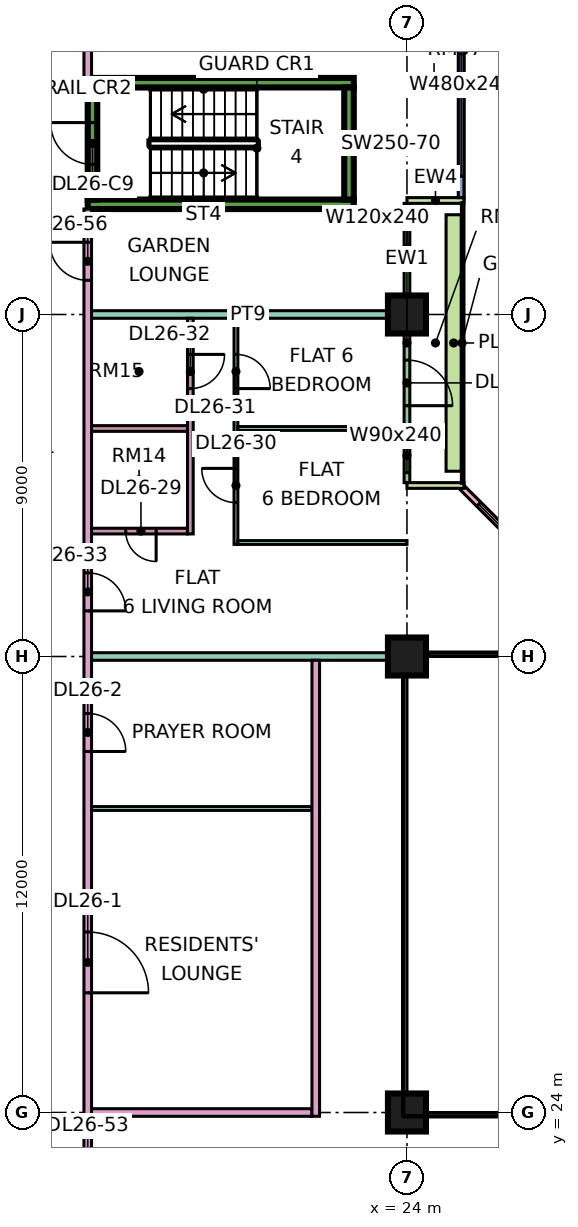
"""IFC4 building model, lengths in metres.
Left out: names, types, materials, properties, quantities, classifications, styles, units other than length and angle.
Written with IfcOpenShell. Run it as: python <this file> out.ifc"""

import sys

from ifc_helpers import new_model, si_unit, direction, frame, frame_2d, origin, origin_2d, place, context, subcontext, project, spatial, rectangle, extrude, element, fill, save


model = new_model("IFC4")
c1 = context("Model", 3, precision=1e-05, world=origin(), true_north=direction((0.0, 1.0)))
c2 = subcontext(c1, "Body", "Model", "MODEL_VIEW")
j1 = project(units=[si_unit("LENGTHUNIT", "METRE"), si_unit("PLANEANGLEUNIT", "RADIAN")], contexts=[c1])
p1 = place(None, origin())
s1 = spatial("IfcSite", under=j1, at=p1, CompositionType="ELEMENT")
p2 = place(p1, origin())
s2 = spatial("IfcBuilding", under=s1, at=p2, CompositionType="ELEMENT")
p3 = place(p2, frame((0.0, 0.0, 114.4)))
s3 = spatial("IfcBuildingStorey", under=s2, at=p3, CompositionType="ELEMENT", Elevation=114.4)
for number, where, z_axis, x_axis in (
    (1, (24.0, 24.0, 0.0), (0.0, 0.0, 1.0), (1.0, 0.0, 0.0)),
    (2, (24.0, 36.0, 0.0), (0.0, 0.0, 1.0), (1.0, 0.0, 0.0)),
    (3, (24.0, 45.0, 0.0), (0.0, 0.0, 1.0), (1.0, 0.0, 0.0)),
):
    element("IfcColumn", number, at=place(p3, frame(where, z_axis=z_axis, x_axis=x_axis)), inside=s3, PredefinedType="COLUMN", context=c2, shape_type="SweptSolid", body=[
        extrude(rectangle(XDim=1.0, YDim=1.0, at=origin_2d()), origin(), (0.0, 0.0, 1.0), 3.75),
    ])
for number, where, z_axis, x_axis in (
    (4, (15.6, 47.9, 0.0), (0.0, 0.0, 1.0), (1.0, 0.0, 0.0)),
    (5, (15.6, 51.1, 0.0), (0.0, 0.0, 1.0), (1.0, 0.0, 0.0)),
):
    element("IfcWall", number, at=place(p3, frame(where, z_axis=z_axis, x_axis=x_axis)), inside=s3, PredefinedType="SHEAR", context=c2, shape_type="SweptSolid", body=[
        extrude(rectangle(XDim=7.0, YDim=0.25, at=frame_2d((3.5, 0.0))), origin(), (0.0, 0.0, 1.0), 3.75),
    ])
p4 = place(p3, frame((15.725, 48.025, 0.0), z_axis=(0.0, 0.0, 1.0), x_axis=(0.0, 1.0, 0.0)))
e6 = element("IfcWall", 6, at=p4, inside=s3, PredefinedType="SHEAR", context=c2, shape_type="SweptSolid", body=[
    extrude(rectangle(XDim=2.95, YDim=0.25, at=frame_2d((1.475, 0.0))), origin(), (0.0, 0.0, 1.0), 3.75),
])
p5 = place(p4, frame((0.925, 0.0, 0.0)))
e7 = element("IfcOpeningElement", 7, at=p5, cuts=e6, PredefinedType="OPENING", context=c2, shape_type="SweptSolid", body=[
    extrude(rectangle(XDim=1.1, YDim=2.2, at=frame_2d((0.55, 1.1))), frame((0.0, 0.135, 0.0), z_axis=(0.0, -1.0, 0.0), x_axis=(1.0, 0.0, 0.0)), (0.0, 0.0, 1.0), 0.27),
])
p6 = place(p3, frame((22.475, 48.025, 0.0), z_axis=(0.0, 0.0, 1.0), x_axis=(0.0, 1.0, 0.0)))
e8 = element("IfcWall", 8, at=p6, inside=s3, PredefinedType="SHEAR", context=c2, shape_type="SweptSolid", body=[
    extrude(rectangle(XDim=2.95, YDim=0.25, at=frame_2d((1.475, 0.0))), origin(), (0.0, 0.0, 1.0), 3.75),
])
p7 = place(p3, frame((28.447, 37.447, 0.0), z_axis=(0.0, 0.0, 1.0), x_axis=(-0.707106781187, 0.707106781187, 0.0)))
e9 = element("IfcWall", 9, at=p7, inside=s3, PredefinedType="SOLIDWALL", context=c2, shape_type="SweptSolid", body=[
    extrude(rectangle(XDim=4.243, YDim=0.15, at=frame_2d((2.121, 0.0))), origin(), (0.0, 0.0, 1.0), 3.35),
])
p8 = place(p7, frame((0.621, 0.0, 0.45)))
e10 = element("IfcOpeningElement", 10, at=p8, cuts=e9, PredefinedType="OPENING", context=c2, shape_type="SweptSolid", body=[
    extrude(rectangle(XDim=3.0, YDim=2.4, at=frame_2d((1.5, 1.2))), frame((0.0, 0.085, 0.0), z_axis=(0.0, -1.0, 0.0), x_axis=(1.0, 0.0, 0.0)), (0.0, 0.0, 1.0), 0.17),
])
p9 = place(p3, frame((24.0, 40.575, 0.0), z_axis=(0.0, 0.0, 1.0), x_axis=(0.0, 1.0, 0.0)))
e11 = element("IfcWall", 11, at=p9, inside=s3, PredefinedType="SOLIDWALL", context=c2, shape_type="SweptSolid", body=[
    extrude(rectangle(XDim=7.35, YDim=0.15, at=frame_2d((3.675, 0.0))), origin(), (0.0, 0.0, 1.0), 3.35),
])
p10 = place(p9, frame((0.262, 0.0, 0.45)))
e12 = element("IfcOpeningElement", 12, at=p10, cuts=e11, PredefinedType="OPENING", context=c2, shape_type="SweptSolid", body=[
    extrude(rectangle(XDim=0.9, YDim=2.4, at=frame_2d((0.45, 1.2))), frame((0.0, 0.085, 0.0), z_axis=(0.0, -1.0, 0.0), x_axis=(1.0, 0.0, 0.0)), (0.0, 0.0, 1.0), 0.17),
])
p11 = place(p9, frame((2.025, 0.0, 0.0)))
e13 = element("IfcOpeningElement", 13, at=p11, cuts=e11, PredefinedType="OPENING", context=c2, shape_type="SweptSolid", body=[
    extrude(rectangle(XDim=1.2, YDim=2.4, at=frame_2d((0.6, 1.2))), frame((0.0, 0.085, 0.0), z_axis=(0.0, -1.0, 0.0), x_axis=(1.0, 0.0, 0.0)), (0.0, 0.0, 1.0), 0.17),
])
p12 = place(p9, frame((5.587, 0.0, 0.45)))
e14 = element("IfcOpeningElement", 14, at=p12, cuts=e11, PredefinedType="OPENING", context=c2, shape_type="SweptSolid", body=[
    extrude(rectangle(XDim=1.2, YDim=2.4, at=frame_2d((0.6, 1.2))), frame((0.0, 0.085, 0.0), z_axis=(0.0, -1.0, 0.0), x_axis=(1.0, 0.0, 0.0)), (0.0, 0.0, 1.0), 0.17),
])
for number, where, z_axis, x_axis in (
    (15, (25.5, 40.5, 0.0), (0.0, 0.0, 1.0), (-1.0, 0.0, 0.0)),
    (16, (25.5, 48.0, 0.0), (0.0, 0.0, 1.0), (-1.0, 0.0, 0.0)),
):
    element("IfcWall", number, at=place(p3, frame(where, z_axis=z_axis, x_axis=x_axis)), inside=s3, PredefinedType="SOLIDWALL", context=c2, shape_type="SweptSolid", body=[
        extrude(rectangle(XDim=1.5, YDim=0.15, at=frame_2d((0.75, 0.0))), origin(), (0.0, 0.0, 1.0), 3.35),
    ])
p13 = place(p3, frame((25.425, 48.075, 0.0), z_axis=(0.0, 0.0, 1.0), x_axis=(0.0, 1.0, 0.0)))
e17 = element("IfcWall", 17, at=p13, inside=s3, PredefinedType="SOLIDWALL", context=c2, shape_type="SweptSolid", body=[
    extrude(rectangle(XDim=13.425, YDim=0.15, at=frame_2d((6.712, 0.0))), origin(), (0.0, 0.0, 1.0), 3.35),
])
p14 = place(p13, frame((0.562, 0.0, 0.45)))
e18 = element("IfcOpeningElement", 18, at=p14, cuts=e17, PredefinedType="OPENING", context=c2, shape_type="SweptSolid", body=[
    extrude(rectangle(XDim=4.8, YDim=2.4, at=frame_2d((2.4, 1.2))), frame((0.0, 0.085, 0.0), z_axis=(0.0, -1.0, 0.0), x_axis=(1.0, 0.0, 0.0)), (0.0, 0.0, 1.0), 0.17),
])
p15 = place(p13, frame((6.525, 0.0, 0.45)))
e19 = element("IfcOpeningElement", 19, at=p15, cuts=e17, PredefinedType="OPENING", context=c2, shape_type="SweptSolid", body=[
    extrude(rectangle(XDim=1.8, YDim=2.4, at=frame_2d((0.9, 1.2))), frame((0.0, 0.085, 0.0), z_axis=(0.0, -1.0, 0.0), x_axis=(1.0, 0.0, 0.0)), (0.0, 0.0, 1.0), 0.17),
])
p16 = place(p13, frame((9.525, 0.0, 0.45)))
e20 = element("IfcOpeningElement", 20, at=p16, cuts=e17, PredefinedType="OPENING", context=c2, shape_type="SweptSolid", body=[
    extrude(rectangle(XDim=1.8, YDim=2.4, at=frame_2d((0.9, 1.2))), frame((0.0, 0.085, 0.0), z_axis=(0.0, -1.0, 0.0), x_axis=(1.0, 0.0, 0.0)), (0.0, 0.0, 1.0), 0.17),
])
p17 = place(p13, frame((12.225, 0.0, 0.45)))
e21 = element("IfcOpeningElement", 21, at=p17, cuts=e17, PredefinedType="OPENING", context=c2, shape_type="SweptSolid", body=[
    extrude(rectangle(XDim=0.9, YDim=2.4, at=frame_2d((0.45, 1.2))), frame((0.0, 0.085, 0.0), z_axis=(0.0, -1.0, 0.0), x_axis=(1.0, 0.0, 0.0)), (0.0, 0.0, 1.0), 0.17),
])
p18 = place(p3, frame((25.229, 40.875, 0.0), z_axis=(0.0, 0.0, 1.0), x_axis=(0.0, 1.0, 0.0)))
e22 = element("IfcWall", 22, at=p18, inside=s3, PredefinedType="SOLIDWALL", context=c2, shape_type="SweptSolid", body=[
    extrude(rectangle(XDim=6.75, YDim=0.4, at=frame_2d((3.375, 0.0))), origin(), (0.0, 0.0, 1.0), 0.7),
])
p19 = place(p3, frame((15.6, 20.0, 0.0), z_axis=(0.0, 0.0, 1.0), x_axis=(0.0, 1.0, 0.0)))
e23 = element("IfcWall", 23, at=p19, inside=s3, PredefinedType="PARTITIONING", context=c2, shape_type="SweptSolid", body=[
    extrude(rectangle(XDim=27.775, YDim=0.2, at=frame_2d((13.887, 0.0))), origin(), (0.0, 0.0, 1.0), 3.35),
])
p20 = place(p19, frame((7.15, 0.0, 0.0)))
e24 = element("IfcOpeningElement", 24, at=p20, cuts=e23, PredefinedType="OPENING", context=c2, shape_type="SweptSolid", body=[
    extrude(rectangle(XDim=1.6, YDim=2.1, at=frame_2d((0.8, 1.05))), frame((0.0, 0.11, 0.0), z_axis=(0.0, -1.0, 0.0), x_axis=(1.0, 0.0, 0.0)), (0.0, 0.0, 1.0), 0.22),
])
p21 = place(p19, frame((13.5, 0.0, 0.0)))
e25 = element("IfcOpeningElement", 25, at=p21, cuts=e23, PredefinedType="OPENING", context=c2, shape_type="SweptSolid", body=[
    extrude(rectangle(XDim=1.0, YDim=2.1, at=frame_2d((0.5, 1.05))), frame((0.0, 0.11, 0.0), z_axis=(0.0, -1.0, 0.0), x_axis=(1.0, 0.0, 0.0)), (0.0, 0.0, 1.0), 0.22),
])
p22 = place(p19, frame((17.2, 0.0, 0.0)))
e26 = element("IfcOpeningElement", 26, at=p22, cuts=e23, PredefinedType="OPENING", context=c2, shape_type="SweptSolid", body=[
    extrude(rectangle(XDim=1.0, YDim=2.1, at=frame_2d((0.5, 1.05))), frame((0.0, 0.11, 0.0), z_axis=(0.0, -1.0, 0.0), x_axis=(1.0, 0.0, 0.0)), (0.0, 0.0, 1.0), 0.22),
])
p23 = place(p19, frame((1.15, 0.0, 0.0)))
e27 = element("IfcOpeningElement", 27, at=p23, cuts=e23, PredefinedType="OPENING", context=c2, shape_type="SweptSolid", body=[
    extrude(rectangle(XDim=1.8, YDim=2.1, at=frame_2d((0.9, 1.05))), frame((0.0, 0.11, 0.0), z_axis=(0.0, -1.0, 0.0), x_axis=(1.0, 0.0, 0.0)), (0.0, 0.0, 1.0), 0.22),
])
p24 = place(p19, frame((25.9, 0.0, 0.0)))
e28 = element("IfcOpeningElement", 28, at=p24, cuts=e23, PredefinedType="OPENING", context=c2, shape_type="SweptSolid", body=[
    extrude(rectangle(XDim=1.0, YDim=2.1, at=frame_2d((0.5, 1.05))), frame((0.0, 0.11, 0.0), z_axis=(0.0, -1.0, 0.0), x_axis=(1.0, 0.0, 0.0)), (0.0, 0.0, 1.0), 0.22),
])
p25 = place(p3, frame((15.6, 51.225, 0.0), z_axis=(0.0, 0.0, 1.0), x_axis=(0.0, 1.0, 0.0)))
e29 = element("IfcWall", 29, at=p25, inside=s3, PredefinedType="PARTITIONING", context=c2, shape_type="SweptSolid", body=[
    extrude(rectangle(XDim=11.701, YDim=0.2, at=frame_2d((5.851, 0.0))), origin(), (0.0, 0.0, 1.0), 3.35),
])
p26 = place(p25, frame((9.975, 0.0, 0.0)))
e30 = element("IfcOpeningElement", 30, at=p26, cuts=e29, PredefinedType="OPENING", context=c2, shape_type="SweptSolid", body=[
    extrude(rectangle(XDim=1.0, YDim=2.1, at=frame_2d((0.5, 1.05))), frame((0.0, 0.11, 0.0), z_axis=(0.0, -1.0, 0.0), x_axis=(1.0, 0.0, 0.0)), (0.0, 0.0, 1.0), 0.22),
])
p27 = place(p3, frame((15.7, 24.0, 0.0), z_axis=(0.0, 0.0, 1.0), x_axis=(1.0, 0.0, 0.0)))
e31 = element("IfcWall", 31, at=p27, inside=s3, PredefinedType="PARTITIONING", context=c2, shape_type="SweptSolid", body=[
    extrude(rectangle(XDim=5.8, YDim=0.2, at=frame_2d((2.9, 0.0))), origin(), (0.0, 0.0, 1.0), 3.35),
])
p28 = place(p3, frame((15.7, 32.0, 0.0), z_axis=(0.0, 0.0, 1.0), x_axis=(1.0, 0.0, 0.0)))
e32 = element("IfcWall", 32, at=p28, inside=s3, PredefinedType="PARTITIONING", context=c2, shape_type="SweptSolid", body=[
    extrude(rectangle(XDim=5.8, YDim=0.1, at=frame_2d((2.9, 0.0))), origin(), (0.0, 0.0, 1.0), 3.35),
])
p29 = place(p3, frame((15.7, 36.0, 0.0), z_axis=(0.0, 0.0, 1.0), x_axis=(1.0, 0.0, 0.0)))
e33 = element("IfcWall", 33, at=p29, inside=s3, PredefinedType="PARTITIONING", context=c2, shape_type="SweptSolid", body=[
    extrude(rectangle(XDim=8.3, YDim=0.2, at=frame_2d((4.15, 0.0))), origin(), (0.0, 0.0, 1.0), 3.35),
])
p30 = place(p3, frame((15.7, 39.3, 0.0), z_axis=(0.0, 0.0, 1.0), x_axis=(1.0, 0.0, 0.0)))
e34 = element("IfcWall", 34, at=p30, inside=s3, PredefinedType="PARTITIONING", context=c2, shape_type="SweptSolid", body=[
    extrude(rectangle(XDim=2.525, YDim=0.15, at=frame_2d((1.263, 0.0))), origin(), (0.0, 0.0, 1.0), 3.35),
])
p31 = place(p30, frame((0.9, 0.0, 0.0)))
e35 = element("IfcOpeningElement", 35, at=p31, cuts=e34, PredefinedType="OPENING", context=c2, shape_type="SweptSolid", body=[
    extrude(rectangle(XDim=0.8, YDim=2.1, at=frame_2d((0.4, 1.05))), frame((0.0, 0.085, 0.0), z_axis=(0.0, -1.0, 0.0), x_axis=(1.0, 0.0, 0.0)), (0.0, 0.0, 1.0), 0.17),
])
p32 = place(p3, frame((15.7, 42.0, 0.0), z_axis=(0.0, 0.0, 1.0), x_axis=(1.0, 0.0, 0.0)))
e36 = element("IfcWall", 36, at=p32, inside=s3, PredefinedType="PARTITIONING", context=c2, shape_type="SweptSolid", body=[
    extrude(rectangle(XDim=2.525, YDim=0.15, at=frame_2d((1.263, 0.0))), origin(), (0.0, 0.0, 1.0), 3.35),
])
p33 = place(p3, frame((15.7, 45.0, 0.0), z_axis=(0.0, 0.0, 1.0), x_axis=(1.0, 0.0, 0.0)))
e37 = element("IfcWall", 37, at=p33, inside=s3, PredefinedType="PARTITIONING", context=c2, shape_type="SweptSolid", body=[
    extrude(rectangle(XDim=8.226, YDim=0.2, at=frame_2d((4.113, 0.0))), origin(), (0.0, 0.0, 1.0), 3.35),
])
p34 = place(p3, frame((18.3, 39.225, 0.0), z_axis=(0.0, 0.0, 1.0), x_axis=(0.0, 1.0, 0.0)))
e38 = element("IfcWall", 38, at=p34, inside=s3, PredefinedType="PARTITIONING", context=c2, shape_type="SweptSolid", body=[
    extrude(rectangle(XDim=5.675, YDim=0.15, at=frame_2d((2.837, 0.0))), origin(), (0.0, 0.0, 1.0), 3.35),
])
p35 = place(p34, frame((3.825, 0.0, 0.0)))
e39 = element("IfcOpeningElement", 39, at=p35, cuts=e38, PredefinedType="OPENING", context=c2, shape_type="SweptSolid", body=[
    extrude(rectangle(XDim=0.9, YDim=2.1, at=frame_2d((0.45, 1.05))), frame((0.0, 0.085, 0.0), z_axis=(0.0, -1.0, 0.0), x_axis=(1.0, 0.0, 0.0)), (0.0, 0.0, 1.0), 0.17),
])
p36 = place(p3, frame((19.5, 38.95, 0.0), z_axis=(0.0, 0.0, 1.0), x_axis=(0.0, 1.0, 0.0)))
e40 = element("IfcWall", 40, at=p36, inside=s3, PredefinedType="PARTITIONING", context=c2, shape_type="SweptSolid", body=[
    extrude(rectangle(XDim=5.95, YDim=0.1, at=frame_2d((2.975, 0.0))), origin(), (0.0, 0.0, 1.0), 3.35),
])
p37 = place(p36, frame((1.1, 0.0, 0.0)))
e41 = element("IfcOpeningElement", 41, at=p37, cuts=e40, PredefinedType="OPENING", context=c2, shape_type="SweptSolid", body=[
    extrude(rectangle(XDim=0.9, YDim=2.1, at=frame_2d((0.45, 1.05))), frame((0.0, 0.06, 0.0), z_axis=(0.0, -1.0, 0.0), x_axis=(1.0, 0.0, 0.0)), (0.0, 0.0, 1.0), 0.12),
])
p38 = place(p36, frame((4.1, 0.0, 0.0)))
e42 = element("IfcOpeningElement", 42, at=p38, cuts=e40, PredefinedType="OPENING", context=c2, shape_type="SweptSolid", body=[
    extrude(rectangle(XDim=0.9, YDim=2.1, at=frame_2d((0.45, 1.05))), frame((0.0, 0.06, 0.0), z_axis=(0.0, -1.0, 0.0), x_axis=(1.0, 0.0, 0.0)), (0.0, 0.0, 1.0), 0.12),
])
p39 = place(p3, frame((19.55, 39.0, 0.0), z_axis=(0.0, 0.0, 1.0), x_axis=(1.0, 0.0, 0.0)))
e43 = element("IfcWall", 43, at=p39, inside=s3, PredefinedType="PARTITIONING", context=c2, shape_type="SweptSolid", body=[
    extrude(rectangle(XDim=4.45, YDim=0.1, at=frame_2d((2.225, 0.0))), origin(), (0.0, 0.0, 1.0), 3.35),
])
p40 = place(p3, frame((19.55, 42.0, 0.0), z_axis=(0.0, 0.0, 1.0), x_axis=(1.0, 0.0, 0.0)))
e44 = element("IfcWall", 44, at=p40, inside=s3, PredefinedType="PARTITIONING", context=c2, shape_type="SweptSolid", body=[
    extrude(rectangle(XDim=4.376, YDim=0.1, at=frame_2d((2.188, 0.0))), origin(), (0.0, 0.0, 1.0), 3.35),
])
p41 = place(p3, frame((21.6, 23.9, 0.0), z_axis=(0.0, 0.0, 1.0), x_axis=(0.0, 1.0, 0.0)))
e45 = element("IfcWall", 45, at=p41, inside=s3, PredefinedType="PARTITIONING", context=c2, shape_type="SweptSolid", body=[
    extrude(rectangle(XDim=12.0, YDim=0.2, at=frame_2d((6.0, 0.0))), origin(), (0.0, 0.0, 1.0), 3.35),
])
p42 = place(p8, origin())
e46 = element("IfcWindow", 46, at=p42, inside=s3, PartitioningType="SINGLE_PANEL", PredefinedType="WINDOW", context=c2, shape_type="SweptSolid", body=[
    extrude(rectangle(XDim=3.0, YDim=2.4, at=frame_2d((1.5, 1.2))), frame((0.0, 0.03, 0.0), z_axis=(0.0, -1.0, 0.0), x_axis=(1.0, 0.0, 0.0)), (0.0, 0.0, 1.0), 0.06),
])
fill(e10, e46)
p43 = place(p10, origin())
e47 = element("IfcWindow", 47, at=p43, inside=s3, PartitioningType="SINGLE_PANEL", PredefinedType="WINDOW", context=c2, shape_type="SweptSolid", body=[
    extrude(rectangle(XDim=0.9, YDim=2.4, at=frame_2d((0.45, 1.2))), frame((0.0, 0.03, 0.0), z_axis=(0.0, -1.0, 0.0), x_axis=(1.0, 0.0, 0.0)), (0.0, 0.0, 1.0), 0.06),
])
fill(e12, e47)
p44 = place(p11, frame((1.2, 0.0, 0.0), z_axis=(0.0, 0.0, 1.0), x_axis=(-1.0, 0.0, 0.0)))
e48 = element("IfcDoor", 48, at=p44, inside=s3, OperationType="DOUBLE_DOOR_SINGLE_SWING", PredefinedType="DOOR", context=c2, shape_type="SweptSolid", body=[
    extrude(rectangle(XDim=1.2, YDim=2.4, at=frame_2d((0.6, 1.2))), frame((0.0, 0.025, 0.0), z_axis=(0.0, -1.0, 0.0), x_axis=(1.0, 0.0, 0.0)), (0.0, 0.0, 1.0), 0.05),
])
fill(e13, e48)
p45 = place(p12, origin())
e49 = element("IfcWindow", 49, at=p45, inside=s3, PartitioningType="SINGLE_PANEL", PredefinedType="WINDOW", context=c2, shape_type="SweptSolid", body=[
    extrude(rectangle(XDim=1.2, YDim=2.4, at=frame_2d((0.6, 1.2))), frame((0.0, 0.03, 0.0), z_axis=(0.0, -1.0, 0.0), x_axis=(1.0, 0.0, 0.0)), (0.0, 0.0, 1.0), 0.06),
])
fill(e14, e49)
p46 = place(p14, origin())
e50 = element("IfcWindow", 50, at=p46, inside=s3, PartitioningType="SINGLE_PANEL", PredefinedType="WINDOW", context=c2, shape_type="SweptSolid", body=[
    extrude(rectangle(XDim=4.8, YDim=2.4, at=frame_2d((2.4, 1.2))), frame((0.0, 0.03, 0.0), z_axis=(0.0, -1.0, 0.0), x_axis=(1.0, 0.0, 0.0)), (0.0, 0.0, 1.0), 0.06),
])
fill(e18, e50)
p47 = place(p5, frame((1.1, 0.0, 0.0), z_axis=(0.0, 0.0, 1.0), x_axis=(-1.0, 0.0, 0.0)))
e51 = element("IfcDoor", 51, at=p47, inside=s3, OperationType="SINGLE_SWING_RIGHT", PredefinedType="DOOR", context=c2, shape_type="SweptSolid", body=[
    extrude(rectangle(XDim=1.1, YDim=2.2, at=frame_2d((0.55, 1.1))), frame((0.0, 0.025, 0.0), z_axis=(0.0, -1.0, 0.0), x_axis=(1.0, 0.0, 0.0)), (0.0, 0.0, 1.0), 0.05),
])
fill(e7, e51)
p48 = place(p20, frame((1.6, 0.0, 0.0), z_axis=(0.0, 0.0, 1.0), x_axis=(-1.0, 0.0, 0.0)))
e52 = element("IfcDoor", 52, at=p48, inside=s3, OperationType="DOUBLE_DOOR_SINGLE_SWING", PredefinedType="DOOR", context=c2, shape_type="SweptSolid", body=[
    extrude(rectangle(XDim=1.6, YDim=2.1, at=frame_2d((0.8, 1.05))), frame((0.0, 0.025, 0.0), z_axis=(0.0, -1.0, 0.0), x_axis=(1.0, 0.0, 0.0)), (0.0, 0.0, 1.0), 0.05),
])
fill(e24, e52)
p49 = place(p21, frame((1.0, 0.0, 0.0), z_axis=(0.0, 0.0, 1.0), x_axis=(-1.0, 0.0, 0.0)))
e53 = element("IfcDoor", 53, at=p49, inside=s3, OperationType="SINGLE_SWING_LEFT", PredefinedType="DOOR", context=c2, shape_type="SweptSolid", body=[
    extrude(rectangle(XDim=1.0, YDim=2.1, at=frame_2d((0.5, 1.05))), frame((0.0, 0.025, 0.0), z_axis=(0.0, -1.0, 0.0), x_axis=(1.0, 0.0, 0.0)), (0.0, 0.0, 1.0), 0.05),
])
fill(e25, e53)
p50 = place(p31, origin())
e54 = element("IfcDoor", 54, at=p50, inside=s3, OperationType="SINGLE_SWING_RIGHT", PredefinedType="DOOR", context=c2, shape_type="SweptSolid", body=[
    extrude(rectangle(XDim=0.8, YDim=2.1, at=frame_2d((0.4, 1.05))), frame((0.0, 0.025, 0.0), z_axis=(0.0, -1.0, 0.0), x_axis=(1.0, 0.0, 0.0)), (0.0, 0.0, 1.0), 0.05),
])
fill(e35, e54)
p51 = place(p37, frame((0.9, 0.0, 0.0), z_axis=(0.0, 0.0, 1.0), x_axis=(-1.0, 0.0, 0.0)))
e55 = element("IfcDoor", 55, at=p51, inside=s3, OperationType="SINGLE_SWING_RIGHT", PredefinedType="DOOR", context=c2, shape_type="SweptSolid", body=[
    extrude(rectangle(XDim=0.9, YDim=2.1, at=frame_2d((0.45, 1.05))), frame((0.0, 0.025, 0.0), z_axis=(0.0, -1.0, 0.0), x_axis=(1.0, 0.0, 0.0)), (0.0, 0.0, 1.0), 0.05),
])
fill(e41, e55)
p52 = place(p38, frame((0.9, 0.0, 0.0), z_axis=(0.0, 0.0, 1.0), x_axis=(-1.0, 0.0, 0.0)))
e56 = element("IfcDoor", 56, at=p52, inside=s3, OperationType="SINGLE_SWING_LEFT", PredefinedType="DOOR", context=c2, shape_type="SweptSolid", body=[
    extrude(rectangle(XDim=0.9, YDim=2.1, at=frame_2d((0.45, 1.05))), frame((0.0, 0.025, 0.0), z_axis=(0.0, -1.0, 0.0), x_axis=(1.0, 0.0, 0.0)), (0.0, 0.0, 1.0), 0.05),
])
fill(e42, e56)
p53 = place(p35, origin())
e57 = element("IfcDoor", 57, at=p53, inside=s3, OperationType="SINGLE_SWING_RIGHT", PredefinedType="DOOR", context=c2, shape_type="SweptSolid", body=[
    extrude(rectangle(XDim=0.9, YDim=2.1, at=frame_2d((0.45, 1.05))), frame((0.0, 0.025, 0.0), z_axis=(0.0, -1.0, 0.0), x_axis=(1.0, 0.0, 0.0)), (0.0, 0.0, 1.0), 0.05),
])
fill(e39, e57)
p54 = place(p22, frame((1.0, 0.0, 0.0), z_axis=(0.0, 0.0, 1.0), x_axis=(-1.0, 0.0, 0.0)))
e58 = element("IfcDoor", 58, at=p54, inside=s3, OperationType="SINGLE_SWING_LEFT", PredefinedType="DOOR", context=c2, shape_type="SweptSolid", body=[
    extrude(rectangle(XDim=1.0, YDim=2.1, at=frame_2d((0.5, 1.05))), frame((0.0, 0.025, 0.0), z_axis=(0.0, -1.0, 0.0), x_axis=(1.0, 0.0, 0.0)), (0.0, 0.0, 1.0), 0.05),
])
fill(e26, e58)
p55 = place(p24, frame((1.0, 0.0, 0.0), z_axis=(0.0, 0.0, 1.0), x_axis=(-1.0, 0.0, 0.0)))
e59 = element("IfcDoor", 59, at=p55, inside=s3, OperationType="SINGLE_SWING_RIGHT", PredefinedType="DOOR", context=c2, shape_type="SweptSolid", body=[
    extrude(rectangle(XDim=1.0, YDim=2.1, at=frame_2d((0.5, 1.05))), frame((0.0, 0.025, 0.0), z_axis=(0.0, -1.0, 0.0), x_axis=(1.0, 0.0, 0.0)), (0.0, 0.0, 1.0), 0.05),
])
fill(e28, e59)
save(model, sys.argv[1])
